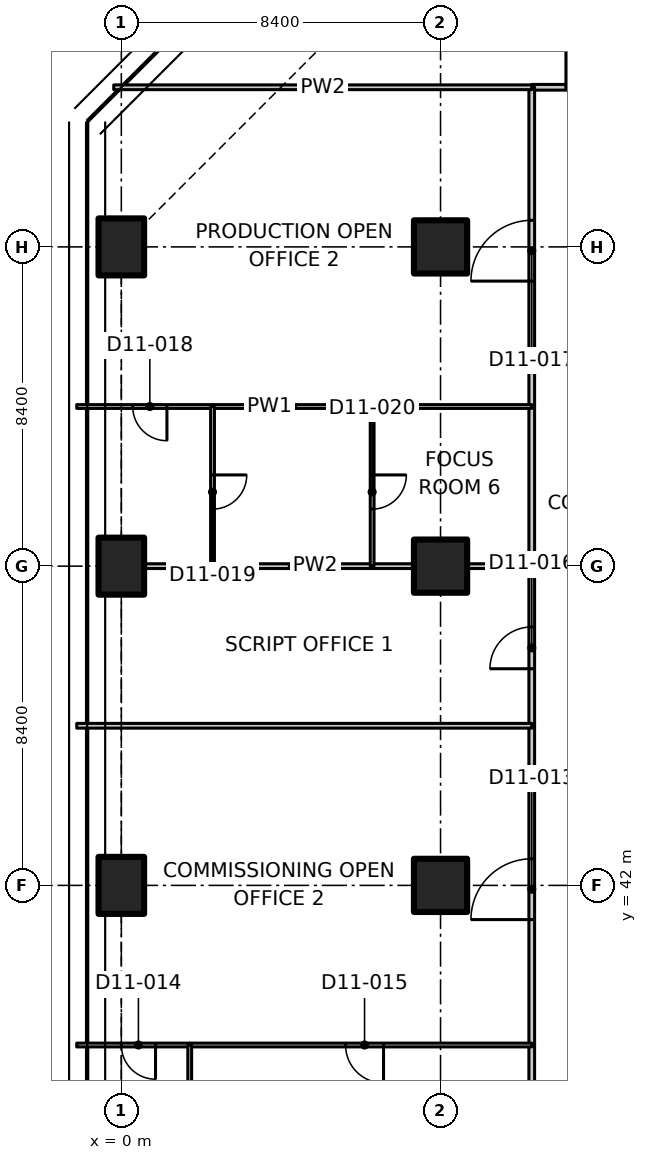
"""IFC4 building model, lengths in metres.
Left out: names, types, materials, properties, quantities, classifications, styles, units other than length and angle.
Written with IfcOpenShell. Run it as: python <this file> out.ifc"""

import sys

from ifc_helpers import new_model, si_unit, direction, frame, frame_2d, origin, origin_2d, place, context, subcontext, project, spatial, polyline, rectangle, outline, extrude, element, fill, save


model = new_model("IFC4")
c1 = context("Model", 3, precision=1e-05, world=origin(), true_north=direction((0.0, 1.0)))
c2 = subcontext(c1, "Body", "Model", "MODEL_VIEW")
j1 = project(units=[si_unit("LENGTHUNIT", "METRE"), si_unit("PLANEANGLEUNIT", "RADIAN")], contexts=[c1])
p1 = place(None, origin())
s1 = spatial("IfcSite", under=j1, at=p1, CompositionType="ELEMENT")
p2 = place(p1, origin())
s2 = spatial("IfcBuilding", under=s1, at=p2, CompositionType="ELEMENT")
p3 = place(p2, frame((0.0, 0.0, 79.7)))
s3 = spatial("IfcBuildingStorey", under=s2, at=p3, CompositionType="ELEMENT", Elevation=79.7)
for number, where, z_axis, x_axis in (
    (1, (0.0, 42.0, 0.0), (0.0, 0.0, 1.0), (1.0, 0.0, 0.0)),
    (2, (0.0, 50.4, 0.0), (0.0, 0.0, 1.0), (1.0, 0.0, 0.0)),
    (3, (0.0, 58.8, 0.0), (0.0, 0.0, 1.0), (1.0, 0.0, 0.0)),
):
    element("IfcColumn", number, at=place(p3, frame(where, z_axis=z_axis, x_axis=x_axis)), inside=s3, PredefinedType="COLUMN", context=c2, shape_type="SweptSolid", body=[
        extrude(rectangle(XDim=1.2, YDim=1.5, at=origin_2d()), origin(), (0.0, 0.0, 1.0), 3.35),
    ])
for number, where, z_axis, x_axis in (
    (4, (8.4, 42.0, 0.0), (0.0, 0.0, 1.0), (1.0, 0.0, 0.0)),
    (5, (8.4, 50.4, 0.0), (0.0, 0.0, 1.0), (1.0, 0.0, 0.0)),
    (6, (8.4, 58.8, 0.0), (0.0, 0.0, 1.0), (1.0, 0.0, 0.0)),
):
    element("IfcColumn", number, at=place(p3, frame(where, z_axis=z_axis, x_axis=x_axis)), inside=s3, PredefinedType="COLUMN", context=c2, shape_type="SweptSolid", body=[
        extrude(rectangle(XDim=1.4, YDim=1.4, at=origin_2d()), origin(), (0.0, 0.0, 1.0), 3.35),
    ])
p4 = place(p3, frame((10.8, 63.0, 0.0), z_axis=(0.0, 0.0, 1.0), x_axis=(1.0, 0.0, 0.0)))
e7 = element("IfcWall", 7, at=p4, inside=s3, PredefinedType="PARTITIONING", context=c2, shape_type="SweptSolid", body=[
    extrude(rectangle(XDim=3.6, YDim=0.15, at=frame_2d((1.8, 0.0))), origin(), (0.0, 0.0, 1.0), 3.33),
])
p5 = place(p4, frame((0.9, 0.0, 0.0)))
e8 = element("IfcOpeningElement", 8, at=p5, cuts=e7, PredefinedType="OPENING", context=c2, shape_type="SweptSolid", body=[
    extrude(rectangle(XDim=2.0, YDim=2.4, at=frame_2d((1.0, 1.2))), frame((0.0, 0.085, 0.0), z_axis=(0.0, -1.0, 0.0), x_axis=(1.0, 0.0, 0.0)), (0.0, 0.0, 1.0), 0.17),
])
p6 = place(p3, frame((10.8, 37.8, 0.0), z_axis=(0.0, 0.0, 1.0), x_axis=(0.0, 1.0, 0.0)))
e9 = element("IfcWall", 9, at=p6, inside=s3, PredefinedType="PARTITIONING", context=c2, shape_type="SweptSolid", body=[
    extrude(rectangle(XDim=8.4, YDim=0.15, at=frame_2d((4.2, 0.0))), origin(), (0.0, 0.0, 1.0), 3.33),
])
p7 = place(p6, frame((3.3, 0.0, 0.0)))
e10 = element("IfcOpeningElement", 10, at=p7, cuts=e9, PredefinedType="OPENING", context=c2, shape_type="SweptSolid", body=[
    extrude(rectangle(XDim=1.6, YDim=2.1, at=frame_2d((0.8, 1.05))), frame((0.0, 0.085, 0.0), z_axis=(0.0, -1.0, 0.0), x_axis=(1.0, 0.0, 0.0)), (0.0, 0.0, 1.0), 0.17),
])
p8 = place(p3, frame((10.8, 33.6, 0.0), z_axis=(0.0, 0.0, 1.0), x_axis=(0.0, 1.0, 0.0)))
e11 = element("IfcWall", 11, at=p8, inside=s3, PredefinedType="PARTITIONING", context=c2, shape_type="SweptSolid", body=[
    extrude(rectangle(XDim=4.2, YDim=0.15, at=frame_2d((2.1, 0.0))), origin(), (0.0, 0.0, 1.0), 3.33),
])
p9 = place(p3, frame((10.8, 46.2, 0.0), z_axis=(0.0, 0.0, 1.0), x_axis=(0.0, 1.0, 0.0)))
e12 = element("IfcWall", 12, at=p9, inside=s3, PredefinedType="PARTITIONING", context=c2, shape_type="SweptSolid", body=[
    extrude(rectangle(XDim=4.2, YDim=0.15, at=frame_2d((2.1, 0.0))), origin(), (0.0, 0.0, 1.0), 3.33),
])
p10 = place(p9, frame((1.5, 0.0, 0.0)))
e13 = element("IfcOpeningElement", 13, at=p10, cuts=e12, PredefinedType="OPENING", context=c2, shape_type="SweptSolid", body=[
    extrude(rectangle(XDim=1.1, YDim=2.1, at=frame_2d((0.55, 1.05))), frame((0.0, 0.085, 0.0), z_axis=(0.0, -1.0, 0.0), x_axis=(1.0, 0.0, 0.0)), (0.0, 0.0, 1.0), 0.17),
])
p11 = place(p3, frame((10.8, 54.6, 0.0), z_axis=(0.0, 0.0, 1.0), x_axis=(0.0, 1.0, 0.0)))
e14 = element("IfcWall", 14, at=p11, inside=s3, PredefinedType="PARTITIONING", context=c2, shape_type="SweptSolid", body=[
    extrude(rectangle(XDim=8.4, YDim=0.15, at=frame_2d((4.2, 0.0))), origin(), (0.0, 0.0, 1.0), 3.33),
])
p12 = place(p11, frame((3.3, 0.0, 0.0)))
e15 = element("IfcOpeningElement", 15, at=p12, cuts=e14, PredefinedType="OPENING", context=c2, shape_type="SweptSolid", body=[
    extrude(rectangle(XDim=1.6, YDim=2.1, at=frame_2d((0.8, 1.05))), frame((0.0, 0.085, 0.0), z_axis=(0.0, -1.0, 0.0), x_axis=(1.0, 0.0, 0.0)), (0.0, 0.0, 1.0), 0.17),
])
p13 = place(p3, frame((10.8, 50.4, 0.0), z_axis=(0.0, 0.0, 1.0), x_axis=(0.0, 1.0, 0.0)))
e16 = element("IfcWall", 16, at=p13, inside=s3, PredefinedType="PARTITIONING", context=c2, shape_type="SweptSolid", body=[
    extrude(rectangle(XDim=4.2, YDim=0.15, at=frame_2d((2.1, 0.0))), origin(), (0.0, 0.0, 1.0), 3.33),
])
p14 = place(p3, frame((10.8, 63.0, 0.0), z_axis=(0.0, 0.0, 1.0), x_axis=(-1.0, 0.0, 0.0)))
e17 = element("IfcWall", 17, at=p14, inside=s3, PredefinedType="PARTITIONING", context=c2, shape_type="SweptSolid", body=[
    extrude(outline(polyline([(0.0, 0.0), (11.0, 0.0), (11.0, 3.33), (7.278, 3.33), (7.276, 2.98), (5.924, 2.98), (5.922, 3.33), (0.0, 3.33), (0.0, 0.0)])), frame((0.0, 0.062, 0.0), z_axis=(0.0, -1.0, 0.0), x_axis=(1.0, 0.0, 0.0)), (0.0, 0.0, 1.0), 0.125),
])
p15 = place(p3, frame((1.8, 37.8, 0.0), z_axis=(0.0, 0.0, 1.0), x_axis=(-1.0, 0.0, 0.0)))
e18 = element("IfcWall", 18, at=p15, inside=s3, PredefinedType="PARTITIONING", context=c2, shape_type="SweptSolid", body=[
    extrude(rectangle(XDim=2.974, YDim=0.1, at=frame_2d((1.487, 0.0))), origin(), (0.0, 0.0, 1.0), 2.98),
])
p16 = place(p15, frame((0.9, 0.0, 0.0)))
e19 = element("IfcOpeningElement", 19, at=p16, cuts=e18, PredefinedType="OPENING", context=c2, shape_type="SweptSolid", body=[
    extrude(rectangle(XDim=0.9, YDim=2.1, at=frame_2d((0.45, 1.05))), frame((0.0, 0.06, 0.0), z_axis=(0.0, -1.0, 0.0), x_axis=(1.0, 0.0, 0.0)), (0.0, 0.0, 1.0), 0.12),
])
p17 = place(p3, frame((10.8, 37.8, 0.0), z_axis=(0.0, 0.0, 1.0), x_axis=(-1.0, 0.0, 0.0)))
e20 = element("IfcWall", 20, at=p17, inside=s3, PredefinedType="PARTITIONING", context=c2, shape_type="SweptSolid", body=[
    extrude(rectangle(XDim=9.0, YDim=0.1, at=frame_2d((4.5, 0.0))), origin(), (0.0, 0.0, 1.0), 3.33),
])
p18 = place(p17, frame((3.9, 0.0, 0.0)))
e21 = element("IfcOpeningElement", 21, at=p18, cuts=e20, PredefinedType="OPENING", context=c2, shape_type="SweptSolid", body=[
    extrude(rectangle(XDim=1.0, YDim=2.1, at=frame_2d((0.5, 1.05))), frame((0.0, 0.06, 0.0), z_axis=(0.0, -1.0, 0.0), x_axis=(1.0, 0.0, 0.0)), (0.0, 0.0, 1.0), 0.12),
])
p19 = place(p3, frame((-1.174, 46.2, 0.0), z_axis=(0.0, 0.0, 1.0), x_axis=(1.0, 0.0, 0.0)))
e22 = element("IfcWall", 22, at=p19, inside=s3, PredefinedType="PARTITIONING", context=c2, shape_type="SweptSolid", body=[
    extrude(outline(polyline([(0.0, 0.0), (11.974, 0.0), (11.974, 3.33), (1.624, 3.33), (1.622, 2.98), (0.726, 2.98), (0.724, 3.33), (0.074, 3.33), (0.0, 3.33), (0.0, 0.0)])), frame((0.0, 0.062, 0.0), z_axis=(0.0, -1.0, 0.0), x_axis=(1.0, 0.0, 0.0)), (0.0, 0.0, 1.0), 0.125),
])
p20 = place(p3, frame((1.8, 37.8, 0.0), z_axis=(0.0, 0.0, 1.0), x_axis=(0.0, -1.0, 0.0)))
e23 = element("IfcWall", 23, at=p20, inside=s3, PredefinedType="PARTITIONING", context=c2, shape_type="SweptSolid", body=[
    extrude(rectangle(XDim=4.2, YDim=0.1, at=frame_2d((2.1, 0.0))), origin(), (0.0, 0.0, 1.0), 3.33),
])
p21 = place(p3, frame((0.62, 50.4, 0.0), z_axis=(0.0, 0.0, 1.0), x_axis=(1.0, 0.0, 0.0)))
e24 = element("IfcWall", 24, at=p21, inside=s3, PredefinedType="PARTITIONING", context=c2, shape_type="SweptSolid", body=[
    extrude(rectangle(XDim=1.78, YDim=0.125, at=frame_2d((0.89, 0.0))), origin(), (0.0, 0.0, 1.0), 3.33),
])
p22 = place(p3, frame((2.4, 50.4, 0.0), z_axis=(0.0, 0.0, 1.0), x_axis=(1.0, 0.0, 0.0)))
e25 = element("IfcWall", 25, at=p22, inside=s3, PredefinedType="PARTITIONING", context=c2, shape_type="SweptSolid", body=[
    extrude(rectangle(XDim=4.2, YDim=0.125, at=frame_2d((2.1, 0.0))), origin(), (0.0, 0.0, 1.0), 3.33),
])
p23 = place(p3, frame((6.6, 50.4, 0.0), z_axis=(0.0, 0.0, 1.0), x_axis=(1.0, 0.0, 0.0)))
e26 = element("IfcWall", 26, at=p23, inside=s3, PredefinedType="PARTITIONING", context=c2, shape_type="SweptSolid", body=[
    extrude(rectangle(XDim=1.08, YDim=0.125, at=frame_2d((0.54, 0.0))), origin(), (0.0, 0.0, 1.0), 3.33),
])
p24 = place(p3, frame((9.12, 50.4, 0.0), z_axis=(0.0, 0.0, 1.0), x_axis=(1.0, 0.0, 0.0)))
e27 = element("IfcWall", 27, at=p24, inside=s3, PredefinedType="PARTITIONING", context=c2, shape_type="SweptSolid", body=[
    extrude(rectangle(XDim=1.68, YDim=0.125, at=frame_2d((0.84, 0.0))), origin(), (0.0, 0.0, 1.0), 3.33),
])
p25 = place(p3, frame((2.4, 54.6, 0.0), z_axis=(0.0, 0.0, 1.0), x_axis=(-1.0, 0.0, 0.0)))
e28 = element("IfcWall", 28, at=p25, inside=s3, PredefinedType="PARTITIONING", context=c2, shape_type="SweptSolid", body=[
    extrude(rectangle(XDim=3.574, YDim=0.1, at=frame_2d((1.787, 0.0))), origin(), (0.0, 0.0, 1.0), 2.98),
])
p26 = place(p25, frame((1.2, 0.0, 0.0)))
e29 = element("IfcOpeningElement", 29, at=p26, cuts=e28, PredefinedType="OPENING", context=c2, shape_type="SweptSolid", body=[
    extrude(rectangle(XDim=0.9, YDim=2.1, at=frame_2d((0.45, 1.05))), frame((0.0, 0.06, 0.0), z_axis=(0.0, -1.0, 0.0), x_axis=(1.0, 0.0, 0.0)), (0.0, 0.0, 1.0), 0.12),
])
p27 = place(p3, frame((6.6, 54.6, 0.0), z_axis=(0.0, 0.0, 1.0), x_axis=(-1.0, 0.0, 0.0)))
e30 = element("IfcWall", 30, at=p27, inside=s3, PredefinedType="PARTITIONING", context=c2, shape_type="SweptSolid", body=[
    extrude(rectangle(XDim=4.2, YDim=0.1, at=frame_2d((2.1, 0.0))), origin(), (0.0, 0.0, 1.0), 3.33),
])
p28 = place(p3, frame((10.8, 54.6, 0.0), z_axis=(0.0, 0.0, 1.0), x_axis=(-1.0, 0.0, 0.0)))
e31 = element("IfcWall", 31, at=p28, inside=s3, PredefinedType="PARTITIONING", context=c2, shape_type="SweptSolid", body=[
    extrude(rectangle(XDim=4.2, YDim=0.1, at=frame_2d((2.1, 0.0))), origin(), (0.0, 0.0, 1.0), 3.33),
])
p29 = place(p3, frame((2.4, 54.6, 0.0), z_axis=(0.0, 0.0, 1.0), x_axis=(0.0, -1.0, 0.0)))
e32 = element("IfcWall", 32, at=p29, inside=s3, PredefinedType="PARTITIONING", context=c2, shape_type="SweptSolid", body=[
    extrude(rectangle(XDim=4.2, YDim=0.1, at=frame_2d((2.1, 0.0))), origin(), (0.0, 0.0, 1.0), 3.33),
])
p30 = place(p29, frame((1.8, 0.0, 0.0)))
e33 = element("IfcOpeningElement", 33, at=p30, cuts=e32, PredefinedType="OPENING", context=c2, shape_type="SweptSolid", body=[
    extrude(rectangle(XDim=0.9, YDim=2.1, at=frame_2d((0.45, 1.05))), frame((0.0, 0.06, 0.0), z_axis=(0.0, -1.0, 0.0), x_axis=(1.0, 0.0, 0.0)), (0.0, 0.0, 1.0), 0.12),
])
p31 = place(p3, frame((6.6, 54.6, 0.0), z_axis=(0.0, 0.0, 1.0), x_axis=(0.0, -1.0, 0.0)))
e34 = element("IfcWall", 34, at=p31, inside=s3, PredefinedType="PARTITIONING", context=c2, shape_type="SweptSolid", body=[
    extrude(rectangle(XDim=4.2, YDim=0.1, at=frame_2d((2.1, 0.0))), origin(), (0.0, 0.0, 1.0), 3.33),
])
p32 = place(p31, frame((1.8, 0.0, 0.0)))
e35 = element("IfcOpeningElement", 35, at=p32, cuts=e34, PredefinedType="OPENING", context=c2, shape_type="SweptSolid", body=[
    extrude(rectangle(XDim=0.9, YDim=2.1, at=frame_2d((0.45, 1.05))), frame((0.0, 0.06, 0.0), z_axis=(0.0, -1.0, 0.0), x_axis=(1.0, 0.0, 0.0)), (0.0, 0.0, 1.0), 0.12),
])
p33 = place(p5, origin())
e36 = element("IfcDoor", 36, at=p33, inside=s3, OperationType="DOUBLE_DOOR_SINGLE_SWING", PredefinedType="DOOR", context=c2, shape_type="SweptSolid", body=[
    extrude(rectangle(XDim=2.0, YDim=2.4, at=frame_2d((1.0, 1.2))), frame((0.0, 0.025, 0.0), z_axis=(0.0, -1.0, 0.0), x_axis=(1.0, 0.0, 0.0)), (0.0, 0.0, 1.0), 0.05),
])
fill(e8, e36)
p34 = place(p7, origin())
e37 = element("IfcDoor", 37, at=p34, inside=s3, OperationType="DOUBLE_DOOR_SINGLE_SWING", PredefinedType="DOOR", context=c2, shape_type="SweptSolid", body=[
    extrude(rectangle(XDim=1.6, YDim=2.1, at=frame_2d((0.8, 1.05))), frame((0.0, 0.025, 0.0), z_axis=(0.0, -1.0, 0.0), x_axis=(1.0, 0.0, 0.0)), (0.0, 0.0, 1.0), 0.05),
])
fill(e10, e37)
p35 = place(p16, origin())
e38 = element("IfcDoor", 38, at=p35, inside=s3, OperationType="SINGLE_SWING_LEFT", PredefinedType="DOOR", context=c2, shape_type="SweptSolid", body=[
    extrude(rectangle(XDim=0.9, YDim=2.1, at=frame_2d((0.45, 1.05))), frame((0.0, 0.025, 0.0), z_axis=(0.0, -1.0, 0.0), x_axis=(1.0, 0.0, 0.0)), (0.0, 0.0, 1.0), 0.05),
])
fill(e19, e38)
p36 = place(p18, origin())
e39 = element("IfcDoor", 39, at=p36, inside=s3, OperationType="SINGLE_SWING_LEFT", PredefinedType="DOOR", context=c2, shape_type="SweptSolid", body=[
    extrude(rectangle(XDim=1.0, YDim=2.1, at=frame_2d((0.5, 1.05))), frame((0.0, 0.025, 0.0), z_axis=(0.0, -1.0, 0.0), x_axis=(1.0, 0.0, 0.0)), (0.0, 0.0, 1.0), 0.05),
])
fill(e21, e39)
p37 = place(p10, origin())
e40 = element("IfcDoor", 40, at=p37, inside=s3, OperationType="SINGLE_SWING_LEFT", PredefinedType="DOOR", context=c2, shape_type="SweptSolid", body=[
    extrude(rectangle(XDim=1.1, YDim=2.1, at=frame_2d((0.55, 1.05))), frame((0.0, 0.025, 0.0), z_axis=(0.0, -1.0, 0.0), x_axis=(1.0, 0.0, 0.0)), (0.0, 0.0, 1.0), 0.05),
])
fill(e13, e40)
p38 = place(p12, origin())
e41 = element("IfcDoor", 41, at=p38, inside=s3, OperationType="DOUBLE_DOOR_SINGLE_SWING", PredefinedType="DOOR", context=c2, shape_type="SweptSolid", body=[
    extrude(rectangle(XDim=1.6, YDim=2.1, at=frame_2d((0.8, 1.05))), frame((0.0, 0.025, 0.0), z_axis=(0.0, -1.0, 0.0), x_axis=(1.0, 0.0, 0.0)), (0.0, 0.0, 1.0), 0.05),
])
fill(e15, e41)
p39 = place(p26, origin())
e42 = element("IfcDoor", 42, at=p39, inside=s3, OperationType="SINGLE_SWING_LEFT", PredefinedType="DOOR", context=c2, shape_type="SweptSolid", body=[
    extrude(rectangle(XDim=0.9, YDim=2.1, at=frame_2d((0.45, 1.05))), frame((0.0, 0.025, 0.0), z_axis=(0.0, -1.0, 0.0), x_axis=(1.0, 0.0, 0.0)), (0.0, 0.0, 1.0), 0.05),
])
fill(e29, e42)
p40 = place(p30, origin())
e43 = element("IfcDoor", 43, at=p40, inside=s3, OperationType="SINGLE_SWING_LEFT", PredefinedType="DOOR", context=c2, shape_type="SweptSolid", body=[
    extrude(rectangle(XDim=0.9, YDim=2.1, at=frame_2d((0.45, 1.05))), frame((0.0, 0.025, 0.0), z_axis=(0.0, -1.0, 0.0), x_axis=(1.0, 0.0, 0.0)), (0.0, 0.0, 1.0), 0.05),
])
fill(e33, e43)
p41 = place(p32, origin())
e44 = element("IfcDoor", 44, at=p41, inside=s3, OperationType="SINGLE_SWING_LEFT", PredefinedType="DOOR", context=c2, shape_type="SweptSolid", body=[
    extrude(rectangle(XDim=0.9, YDim=2.1, at=frame_2d((0.45, 1.05))), frame((0.0, 0.025, 0.0), z_axis=(0.0, -1.0, 0.0), x_axis=(1.0, 0.0, 0.0)), (0.0, 0.0, 1.0), 0.05),
])
fill(e35, e44)
save(model, sys.argv[1])
